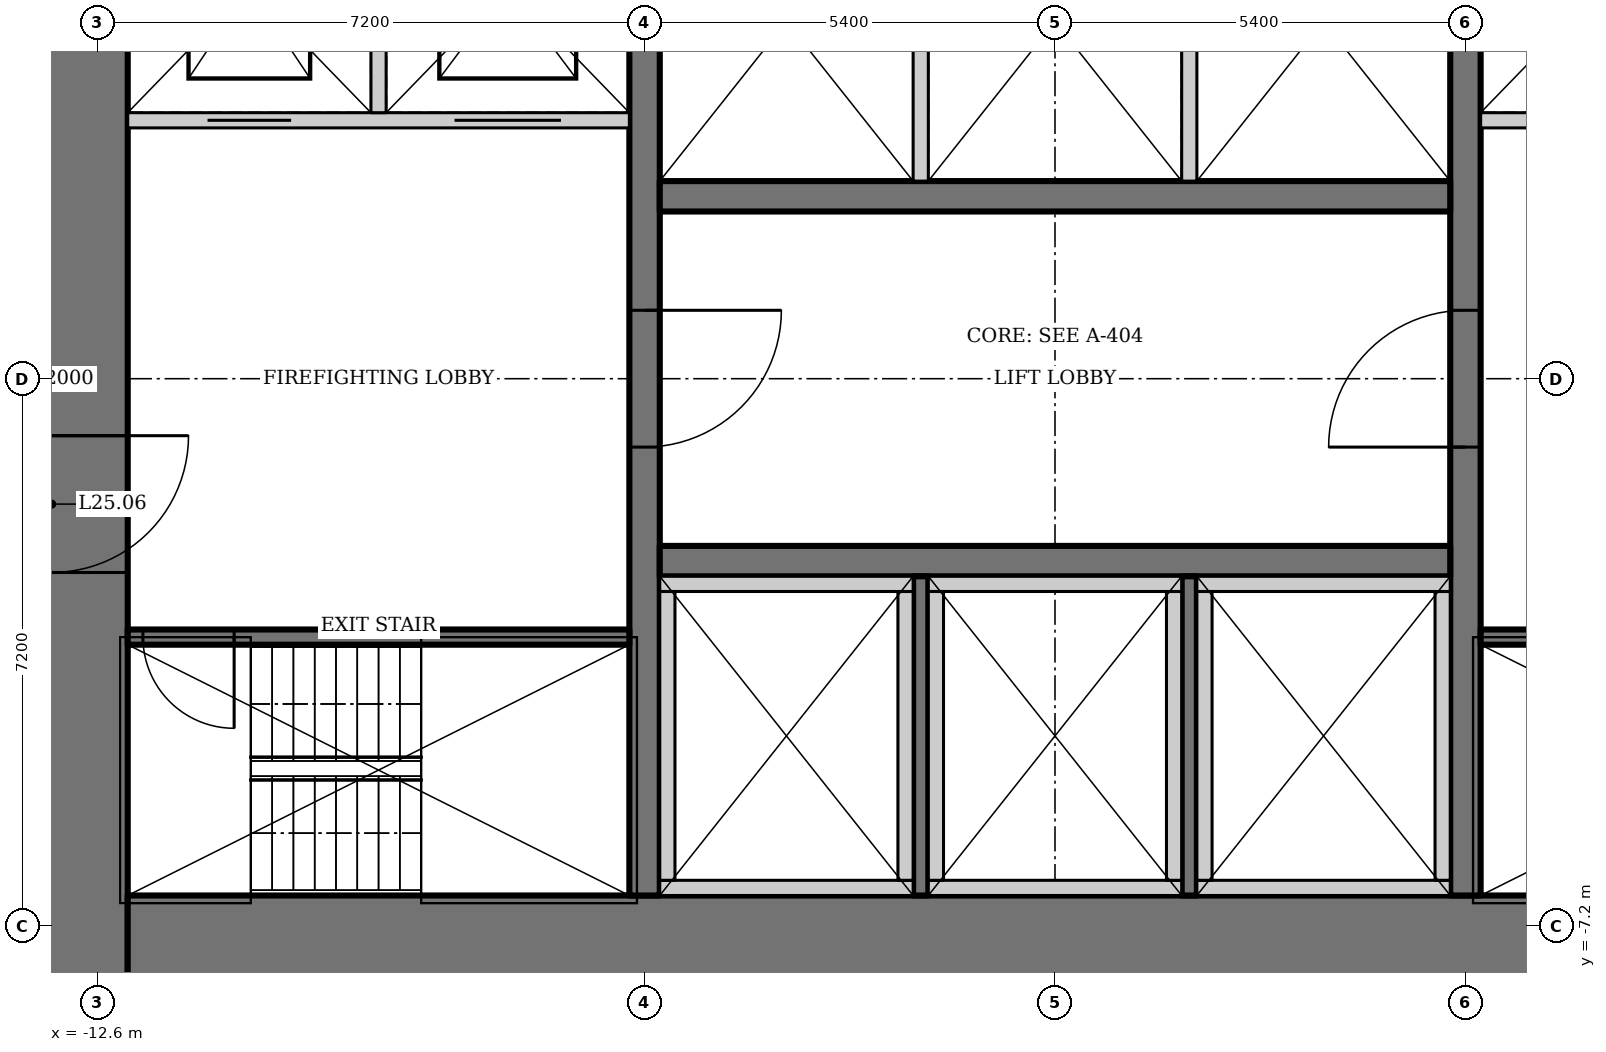
"""IFC4 building model, lengths in metres.
Left out: names, types, materials, properties, quantities, classifications, styles, units other than length and angle.
Written with IfcOpenShell. Run it as: python <this file> out.ifc"""

import sys

from ifc_helpers import new_model, si_unit, direction, frame, frame_2d, origin, place, context, subcontext, project, spatial, rectangle, extrude, element, fill, save


model = new_model("IFC4")
c1 = context("Model", 3, precision=1e-05, world=origin(), true_north=direction((0.0, 1.0)))
c2 = subcontext(c1, "Body", "Model", "MODEL_VIEW")
j1 = project(units=[si_unit("LENGTHUNIT", "METRE"), si_unit("PLANEANGLEUNIT", "RADIAN")], contexts=[c1])
p1 = place(None, origin())
s1 = spatial("IfcSite", under=j1, at=p1, CompositionType="ELEMENT")
p2 = place(p1, origin())
s2 = spatial("IfcBuilding", under=s1, at=p2, CompositionType="ELEMENT")
p3 = place(p2, frame((0.0, 0.0, 105.4)))
s3 = spatial("IfcBuildingStorey", under=s2, at=p3, CompositionType="ELEMENT", Elevation=105.4)
p4 = place(p3, frame((-13.2, 13.0, 0.0), z_axis=(0.0, 0.0, 1.0), x_axis=(0.0, -1.0, 0.0)))
e1 = element("IfcWall", 1, at=p4, inside=s3, PredefinedType="SHEAR", context=c2, shape_type="SweptSolid", body=[
    extrude(rectangle(XDim=26.0, YDim=2.0, at=frame_2d((13.0, 0.0))), origin(), (0.0, 0.0, 1.0), 6.0),
])
p5 = place(p4, frame((13.75, 0.0, 0.0)))
e2 = element("IfcOpeningElement", 2, at=p5, cuts=e1, PredefinedType="OPENING", context=c2, shape_type="SweptSolid", body=[
    extrude(rectangle(XDim=1.8, YDim=2.1, at=frame_2d((0.9, 1.05))), frame((0.0, 1.01, 0.0), z_axis=(0.0, -1.0, 0.0), x_axis=(1.0, 0.0, 0.0)), (0.0, 0.0, 1.0), 2.02),
])
p6 = place(p3, frame((-12.2, -8.0, 0.0), z_axis=(0.0, 0.0, 1.0), x_axis=(1.0, 0.0, 0.0)))
e3 = element("IfcWall", 3, at=p6, inside=s3, PredefinedType="SHEAR", context=c2, shape_type="SweptSolid", body=[
    extrude(rectangle(XDim=24.4, YDim=2.4, at=frame_2d((12.2, 0.0))), origin(), (0.0, 0.0, 1.0), 6.0),
])
p7 = place(p3, frame((5.4, -6.8, 0.0), z_axis=(0.0, 0.0, 1.0), x_axis=(0.0, 1.0, 0.0)))
e4 = element("IfcWall", 4, at=p7, inside=s3, PredefinedType="SHEAR", context=c2, shape_type="SweptSolid", body=[
    extrude(rectangle(XDim=13.6, YDim=0.4, at=frame_2d((6.8, 0.0))), origin(), (0.0, 0.0, 1.0), 6.0),
])
p8 = place(p7, frame((5.9, 0.0, 0.0)))
e5 = element("IfcOpeningElement", 5, at=p8, cuts=e4, PredefinedType="OPENING", context=c2, shape_type="SweptSolid", body=[
    extrude(rectangle(XDim=1.8, YDim=2.1, at=frame_2d((0.9, 1.05))), frame((0.0, 0.21, 0.0), z_axis=(0.0, -1.0, 0.0), x_axis=(1.0, 0.0, 0.0)), (0.0, 0.0, 1.0), 0.42),
])
p9 = place(p3, frame((-5.4, 6.8, 0.0), z_axis=(0.0, 0.0, 1.0), x_axis=(0.0, -1.0, 0.0)))
e6 = element("IfcWall", 6, at=p9, inside=s3, PredefinedType="SHEAR", context=c2, shape_type="SweptSolid", body=[
    extrude(rectangle(XDim=13.6, YDim=0.4, at=frame_2d((6.8, 0.0))), origin(), (0.0, 0.0, 1.0), 6.0),
])
p10 = place(p9, frame((5.9, 0.0, 0.0)))
e7 = element("IfcOpeningElement", 7, at=p10, cuts=e6, PredefinedType="OPENING", context=c2, shape_type="SweptSolid", body=[
    extrude(rectangle(XDim=1.8, YDim=2.1, at=frame_2d((0.9, 1.05))), frame((0.0, 0.21, 0.0), z_axis=(0.0, -1.0, 0.0), x_axis=(1.0, 0.0, 0.0)), (0.0, 0.0, 1.0), 0.42),
])
p11 = place(p3, frame((-5.2, -2.4, 0.0), z_axis=(0.0, 0.0, 1.0), x_axis=(1.0, 0.0, 0.0)))
e8 = element("IfcWall", 8, at=p11, inside=s3, PredefinedType="SHEAR", context=c2, shape_type="SweptSolid", body=[
    extrude(rectangle(XDim=10.4, YDim=0.4, at=frame_2d((5.2, 0.0))), origin(), (0.0, 0.0, 1.0), 6.0),
])
for number, where, z_axis, x_axis in (
    (9, (-1.767, -2.6, 0.0), (0.0, 0.0, 1.0), (0.0, -1.0, 0.0)),
    (10, (1.767, -2.6, 0.0), (0.0, 0.0, 1.0), (0.0, -1.0, 0.0)),
):
    element("IfcWall", number, at=place(p3, frame(where, z_axis=z_axis, x_axis=x_axis)), inside=s3, PredefinedType="SOLIDWALL", context=c2, shape_type="SweptSolid", body=[
        extrude(rectangle(XDim=4.2, YDim=0.2, at=frame_2d((2.1, 0.0))), origin(), (0.0, 0.0, 1.0), 6.0),
    ])
p12 = place(p3, frame((5.2, 2.4, 0.0), z_axis=(0.0, 0.0, 1.0), x_axis=(-1.0, 0.0, 0.0)))
e11 = element("IfcWall", 11, at=p12, inside=s3, PredefinedType="SHEAR", context=c2, shape_type="SweptSolid", body=[
    extrude(rectangle(XDim=10.4, YDim=0.4, at=frame_2d((5.2, 0.0))), origin(), (0.0, 0.0, 1.0), 6.0),
])
for number, where, z_axis, x_axis in (
    (12, (-1.767, 2.6, 0.0), (0.0, 0.0, 1.0), (0.0, 1.0, 0.0)),
    (13, (1.767, 2.6, 0.0), (0.0, 0.0, 1.0), (0.0, 1.0, 0.0)),
):
    element("IfcWall", number, at=place(p3, frame(where, z_axis=z_axis, x_axis=x_axis)), inside=s3, PredefinedType="SOLIDWALL", context=c2, shape_type="SweptSolid", body=[
        extrude(rectangle(XDim=4.2, YDim=0.2, at=frame_2d((2.1, 0.0))), origin(), (0.0, 0.0, 1.0), 6.0),
    ])
p13 = place(p3, frame((5.6, -3.4, 0.0), z_axis=(0.0, 0.0, 1.0), x_axis=(1.0, 0.0, 0.0)))
e14 = element("IfcWall", 14, at=p13, inside=s3, PredefinedType="SHEAR", context=c2, shape_type="SweptSolid", body=[
    extrude(rectangle(XDim=6.6, YDim=0.2, at=frame_2d((3.3, 0.0))), origin(), (0.0, 0.0, 1.0), 6.0),
])
p14 = place(p13, frame((5.2, 0.0, 0.0)))
e15 = element("IfcOpeningElement", 15, at=p14, cuts=e14, PredefinedType="OPENING", context=c2, shape_type="SweptSolid", body=[
    extrude(rectangle(XDim=1.2, YDim=2.1, at=frame_2d((0.6, 1.05))), frame((0.0, 0.11, 0.0), z_axis=(0.0, -1.0, 0.0), x_axis=(1.0, 0.0, 0.0)), (0.0, 0.0, 1.0), 0.22),
])
p15 = place(p3, frame((12.2, 3.4, 0.0), z_axis=(0.0, 0.0, 1.0), x_axis=(-1.0, 0.0, 0.0)))
e16 = element("IfcWall", 16, at=p15, inside=s3, PredefinedType="SOLIDWALL", context=c2, shape_type="SweptSolid", body=[
    extrude(rectangle(XDim=6.6, YDim=0.2, at=frame_2d((3.3, 0.0))), origin(), (0.0, 0.0, 1.0), 6.0),
])
p16 = place(p15, frame((4.45, 0.0, 0.0)))
e17 = element("IfcOpeningElement", 17, at=p16, cuts=e16, PredefinedType="OPENING", context=c2, shape_type="SweptSolid", body=[
    extrude(rectangle(XDim=1.1, YDim=2.2, at=frame_2d((0.55, 1.1))), frame((0.0, 0.11, 0.0), z_axis=(0.0, -1.0, 0.0), x_axis=(1.0, 0.0, 0.0)), (0.0, 0.0, 1.0), 0.22),
])
p17 = place(p15, frame((0.9, 0.0, 0.0)))
e18 = element("IfcOpeningElement", 18, at=p17, cuts=e16, PredefinedType="OPENING", context=c2, shape_type="SweptSolid", body=[
    extrude(rectangle(XDim=1.4, YDim=2.2, at=frame_2d((0.7, 1.1))), frame((0.0, 0.11, 0.0), z_axis=(0.0, -1.0, 0.0), x_axis=(1.0, 0.0, 0.0)), (0.0, 0.0, 1.0), 0.22),
])
p18 = place(p3, frame((-5.6, -3.4, 0.0), z_axis=(0.0, 0.0, 1.0), x_axis=(-1.0, 0.0, 0.0)))
e19 = element("IfcWall", 19, at=p18, inside=s3, PredefinedType="SHEAR", context=c2, shape_type="SweptSolid", body=[
    extrude(rectangle(XDim=6.6, YDim=0.2, at=frame_2d((3.3, 0.0))), origin(), (0.0, 0.0, 1.0), 6.0),
])
p19 = place(p18, frame((5.2, 0.0, 0.0)))
e20 = element("IfcOpeningElement", 20, at=p19, cuts=e19, PredefinedType="OPENING", context=c2, shape_type="SweptSolid", body=[
    extrude(rectangle(XDim=1.2, YDim=2.1, at=frame_2d((0.6, 1.05))), frame((0.0, 0.11, 0.0), z_axis=(0.0, -1.0, 0.0), x_axis=(1.0, 0.0, 0.0)), (0.0, 0.0, 1.0), 0.22),
])
p20 = place(p3, frame((-12.2, 3.4, 0.0), z_axis=(0.0, 0.0, 1.0), x_axis=(1.0, 0.0, 0.0)))
e21 = element("IfcWall", 21, at=p20, inside=s3, PredefinedType="SOLIDWALL", context=c2, shape_type="SweptSolid", body=[
    extrude(rectangle(XDim=6.6, YDim=0.2, at=frame_2d((3.3, 0.0))), origin(), (0.0, 0.0, 1.0), 6.0),
])
p21 = place(p20, frame((1.05, 0.0, 0.0)))
e22 = element("IfcOpeningElement", 22, at=p21, cuts=e21, PredefinedType="OPENING", context=c2, shape_type="SweptSolid", body=[
    extrude(rectangle(XDim=1.1, YDim=2.2, at=frame_2d((0.55, 1.1))), frame((0.0, 0.11, 0.0), z_axis=(0.0, -1.0, 0.0), x_axis=(1.0, 0.0, 0.0)), (0.0, 0.0, 1.0), 0.22),
])
p22 = place(p20, frame((4.3, 0.0, 0.0)))
e23 = element("IfcOpeningElement", 23, at=p22, cuts=e21, PredefinedType="OPENING", context=c2, shape_type="SweptSolid", body=[
    extrude(rectangle(XDim=1.4, YDim=2.2, at=frame_2d((0.7, 1.1))), frame((0.0, 0.11, 0.0), z_axis=(0.0, -1.0, 0.0), x_axis=(1.0, 0.0, 0.0)), (0.0, 0.0, 1.0), 0.22),
])
p23 = place(p3, frame((-8.9, 3.5, 0.0), z_axis=(0.0, 0.0, 1.0), x_axis=(0.0, 1.0, 0.0)))
e24 = element("IfcWall", 24, at=p23, inside=s3, PredefinedType="SOLIDWALL", context=c2, shape_type="SweptSolid", body=[
    extrude(rectangle(XDim=3.3, YDim=0.2, at=frame_2d((1.65, 0.0))), origin(), (0.0, 0.0, 1.0), 6.0),
])
p24 = place(p3, frame((-5.2, -6.7, 2.55), z_axis=(0.0, 0.0, 1.0), x_axis=(1.0, 0.0, 0.0)))
e25 = element("IfcWall", 25, at=p24, inside=s3, PredefinedType="SOLIDWALL", context=c2, shape_type="SweptSolid", body=[
    extrude(rectangle(XDim=3.333, YDim=0.2, at=frame_2d((1.667, 0.0))), origin(), (0.0, 0.0, 1.0), 3.25),
])
p25 = place(p3, frame((-1.967, -6.6, 2.55), z_axis=(0.0, 0.0, 1.0), x_axis=(0.0, 1.0, 0.0)))
e26 = element("IfcWall", 26, at=p25, inside=s3, PredefinedType="SOLIDWALL", context=c2, shape_type="SweptSolid", body=[
    extrude(rectangle(XDim=3.8, YDim=0.2, at=frame_2d((1.9, 0.0))), origin(), (0.0, 0.0, 1.0), 3.25),
])
p26 = place(p3, frame((-1.867, -2.7, 2.55), z_axis=(0.0, 0.0, 1.0), x_axis=(-1.0, 0.0, 0.0)))
e27 = element("IfcWall", 27, at=p26, inside=s3, PredefinedType="SOLIDWALL", context=c2, shape_type="SweptSolid", body=[
    extrude(rectangle(XDim=3.333, YDim=0.2, at=frame_2d((1.667, 0.0))), origin(), (0.0, 0.0, 1.0), 3.25),
])
p27 = place(p3, frame((-5.1, -2.8, 2.55), z_axis=(0.0, 0.0, 1.0), x_axis=(0.0, -1.0, 0.0)))
e28 = element("IfcWall", 28, at=p27, inside=s3, PredefinedType="SOLIDWALL", context=c2, shape_type="SweptSolid", body=[
    extrude(rectangle(XDim=3.8, YDim=0.2, at=frame_2d((1.9, 0.0))), origin(), (0.0, 0.0, 1.0), 3.25),
])
p28 = place(p3, frame((-1.667, -6.7, 2.55), z_axis=(0.0, 0.0, 1.0), x_axis=(1.0, 0.0, 0.0)))
e29 = element("IfcWall", 29, at=p28, inside=s3, PredefinedType="SOLIDWALL", context=c2, shape_type="SweptSolid", body=[
    extrude(rectangle(XDim=3.333, YDim=0.2, at=frame_2d((1.667, 0.0))), origin(), (0.0, 0.0, 1.0), 3.25),
])
p29 = place(p3, frame((1.567, -6.6, 2.55), z_axis=(0.0, 0.0, 1.0), x_axis=(0.0, 1.0, 0.0)))
e30 = element("IfcWall", 30, at=p29, inside=s3, PredefinedType="SOLIDWALL", context=c2, shape_type="SweptSolid", body=[
    extrude(rectangle(XDim=3.8, YDim=0.2, at=frame_2d((1.9, 0.0))), origin(), (0.0, 0.0, 1.0), 3.25),
])
p30 = place(p3, frame((1.667, -2.7, 2.55), z_axis=(0.0, 0.0, 1.0), x_axis=(-1.0, 0.0, 0.0)))
e31 = element("IfcWall", 31, at=p30, inside=s3, PredefinedType="SOLIDWALL", context=c2, shape_type="SweptSolid", body=[
    extrude(rectangle(XDim=3.333, YDim=0.2, at=frame_2d((1.667, 0.0))), origin(), (0.0, 0.0, 1.0), 3.25),
])
p31 = place(p3, frame((-1.567, -2.8, 2.55), z_axis=(0.0, 0.0, 1.0), x_axis=(0.0, -1.0, 0.0)))
e32 = element("IfcWall", 32, at=p31, inside=s3, PredefinedType="SOLIDWALL", context=c2, shape_type="SweptSolid", body=[
    extrude(rectangle(XDim=3.8, YDim=0.2, at=frame_2d((1.9, 0.0))), origin(), (0.0, 0.0, 1.0), 3.25),
])
p32 = place(p3, frame((1.867, -6.7, 2.55), z_axis=(0.0, 0.0, 1.0), x_axis=(1.0, 0.0, 0.0)))
e33 = element("IfcWall", 33, at=p32, inside=s3, PredefinedType="SOLIDWALL", context=c2, shape_type="SweptSolid", body=[
    extrude(rectangle(XDim=3.333, YDim=0.2, at=frame_2d((1.667, 0.0))), origin(), (0.0, 0.0, 1.0), 3.25),
])
p33 = place(p3, frame((5.1, -6.6, 2.55), z_axis=(0.0, 0.0, 1.0), x_axis=(0.0, 1.0, 0.0)))
e34 = element("IfcWall", 34, at=p33, inside=s3, PredefinedType="SOLIDWALL", context=c2, shape_type="SweptSolid", body=[
    extrude(rectangle(XDim=3.8, YDim=0.2, at=frame_2d((1.9, 0.0))), origin(), (0.0, 0.0, 1.0), 3.25),
])
p34 = place(p3, frame((5.2, -2.7, 2.55), z_axis=(0.0, 0.0, 1.0), x_axis=(-1.0, 0.0, 0.0)))
e35 = element("IfcWall", 35, at=p34, inside=s3, PredefinedType="SOLIDWALL", context=c2, shape_type="SweptSolid", body=[
    extrude(rectangle(XDim=3.333, YDim=0.2, at=frame_2d((1.667, 0.0))), origin(), (0.0, 0.0, 1.0), 3.25),
])
p35 = place(p3, frame((1.967, -2.8, 2.55), z_axis=(0.0, 0.0, 1.0), x_axis=(0.0, -1.0, 0.0)))
e36 = element("IfcWall", 36, at=p35, inside=s3, PredefinedType="SOLIDWALL", context=c2, shape_type="SweptSolid", body=[
    extrude(rectangle(XDim=3.8, YDim=0.2, at=frame_2d((1.9, 0.0))), origin(), (0.0, 0.0, 1.0), 3.25),
])
p36 = place(p8, origin())
e37 = element("IfcDoor", 37, at=p36, inside=s3, OperationType="DOUBLE_DOOR_DOUBLE_SWING", PredefinedType="DOOR", context=c2, shape_type="SweptSolid", body=[
    extrude(rectangle(XDim=1.8, YDim=2.1, at=frame_2d((0.9, 1.05))), frame((0.0, 0.025, 0.0), z_axis=(0.0, -1.0, 0.0), x_axis=(1.0, 0.0, 0.0)), (0.0, 0.0, 1.0), 0.05),
])
fill(e5, e37)
p37 = place(p10, origin())
e38 = element("IfcDoor", 38, at=p37, inside=s3, OperationType="DOUBLE_DOOR_DOUBLE_SWING", PredefinedType="DOOR", context=c2, shape_type="SweptSolid", body=[
    extrude(rectangle(XDim=1.8, YDim=2.1, at=frame_2d((0.9, 1.05))), frame((0.0, 0.025, 0.0), z_axis=(0.0, -1.0, 0.0), x_axis=(1.0, 0.0, 0.0)), (0.0, 0.0, 1.0), 0.05),
])
fill(e7, e38)
p38 = place(p19, origin())
e39 = element("IfcDoor", 39, at=p38, inside=s3, OperationType="SINGLE_SWING_RIGHT", PredefinedType="DOOR", context=c2, shape_type="SweptSolid", body=[
    extrude(rectangle(XDim=1.2, YDim=2.1, at=frame_2d((0.6, 1.05))), frame((0.0, 0.025, 0.0), z_axis=(0.0, -1.0, 0.0), x_axis=(1.0, 0.0, 0.0)), (0.0, 0.0, 1.0), 0.05),
])
fill(e20, e39)
p39 = place(p5, origin())
e40 = element("IfcDoor", 40, at=p39, inside=s3, OperationType="DOUBLE_DOOR_DOUBLE_SWING", PredefinedType="DOOR", context=c2, shape_type="SweptSolid", body=[
    extrude(rectangle(XDim=1.8, YDim=2.1, at=frame_2d((0.9, 1.05))), frame((0.0, 0.025, 0.0), z_axis=(0.0, -1.0, 0.0), x_axis=(1.0, 0.0, 0.0)), (0.0, 0.0, 1.0), 0.05),
])
fill(e2, e40)
p40 = place(p21, origin())
e41 = element("IfcDoor", 41, at=p40, inside=s3, OperationType="DOUBLE_DOOR_SLIDING", PredefinedType="DOOR", context=c2, shape_type="SweptSolid", body=[
    extrude(rectangle(XDim=1.1, YDim=2.2, at=frame_2d((0.55, 1.1))), frame((0.0, 0.025, 0.0), z_axis=(0.0, -1.0, 0.0), x_axis=(1.0, 0.0, 0.0)), (0.0, 0.0, 1.0), 0.05),
])
fill(e22, e41)
p41 = place(p22, origin())
e42 = element("IfcDoor", 42, at=p41, inside=s3, OperationType="DOUBLE_DOOR_SLIDING", PredefinedType="DOOR", context=c2, shape_type="SweptSolid", body=[
    extrude(rectangle(XDim=1.4, YDim=2.2, at=frame_2d((0.7, 1.1))), frame((0.0, 0.025, 0.0), z_axis=(0.0, -1.0, 0.0), x_axis=(1.0, 0.0, 0.0)), (0.0, 0.0, 1.0), 0.05),
])
fill(e23, e42)
save(model, sys.argv[1])
